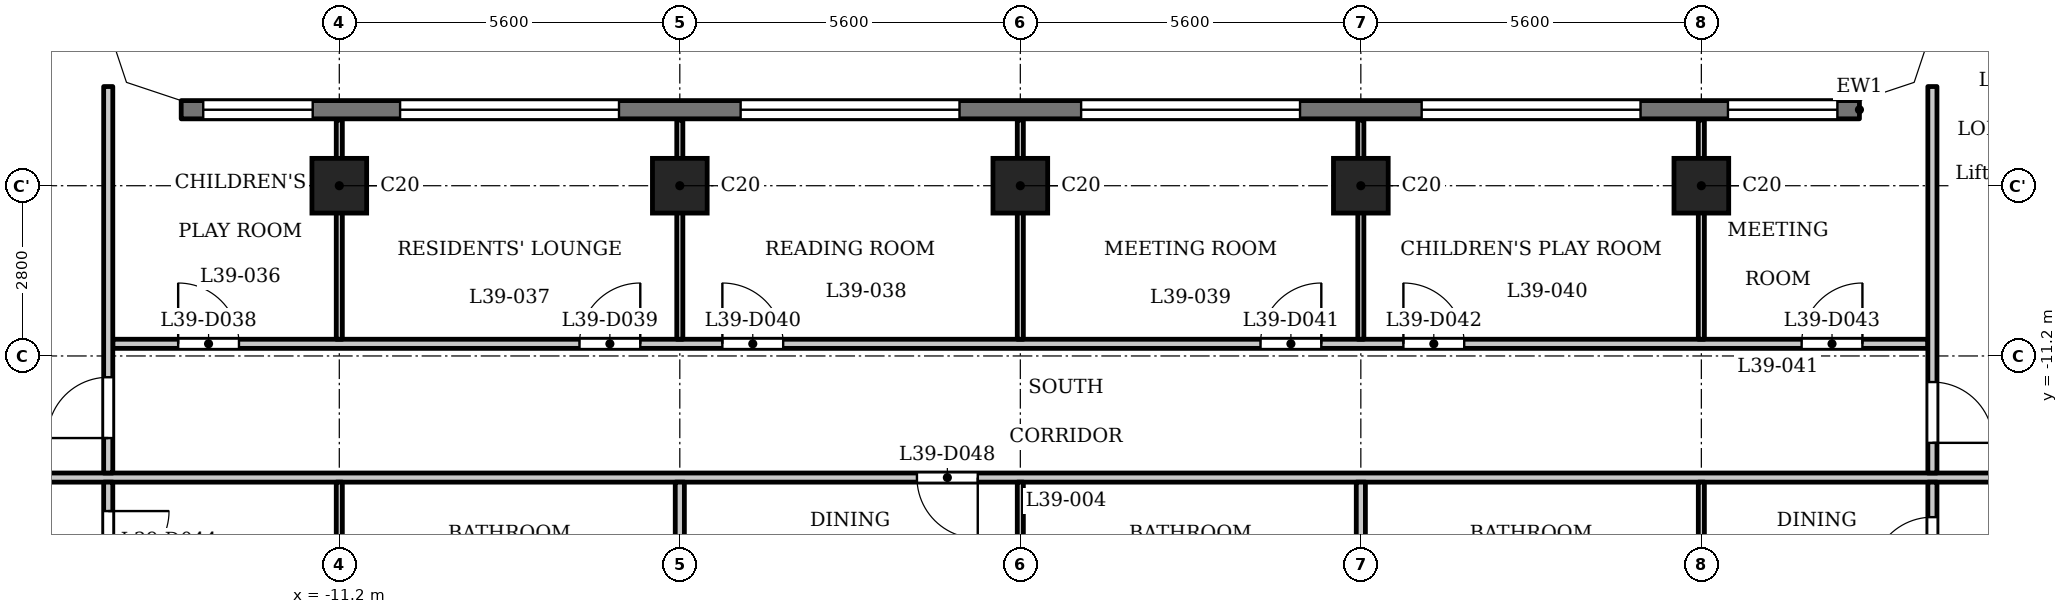
"""IFC4 building model, lengths in metres.
Left out: names, types, materials, properties, quantities, classifications, styles, units other than length and angle.
Written with IfcOpenShell. Run it as: python <this file> out.ifc"""

import sys

from ifc_helpers import new_model, si_unit, direction, frame, frame_2d, origin, origin_2d, place, context, subcontext, project, spatial, polyline, rectangle, outline, extrude, element, fill, save


model = new_model("IFC4")
c1 = context("Model", 3, precision=1e-05, world=origin(), true_north=direction((0.0, 1.0)))
c2 = subcontext(c1, "Body", "Model", "MODEL_VIEW")
j1 = project(units=[si_unit("LENGTHUNIT", "METRE"), si_unit("PLANEANGLEUNIT", "RADIAN")], contexts=[c1])
p1 = place(None, origin())
s1 = spatial("IfcSite", under=j1, at=p1, CompositionType="ELEMENT")
p2 = place(p1, origin())
s2 = spatial("IfcBuilding", under=s1, at=p2, CompositionType="ELEMENT")
p3 = place(p2, frame((0.0, 0.0, 153.6)))
s3 = spatial("IfcBuildingStorey", under=s2, at=p3, CompositionType="ELEMENT", Elevation=153.6)
for number, where, z_axis, x_axis in (
    (1, (-11.2, -8.4, 0.0), (0.0, 0.0, 1.0), (1.0, 0.0, 0.0)),
    (2, (-5.6, -8.4, 0.0), (0.0, 0.0, 1.0), (1.0, 0.0, 0.0)),
    (3, (0.0, -8.4, 0.0), (0.0, 0.0, 1.0), (1.0, 0.0, 0.0)),
    (4, (5.6, -8.4, 0.0), (0.0, 0.0, 1.0), (1.0, 0.0, 0.0)),
    (5, (11.2, -8.4, 0.0), (0.0, 0.0, 1.0), (1.0, 0.0, 0.0)),
):
    element("IfcColumn", number, at=place(p3, frame(where, z_axis=z_axis, x_axis=x_axis)), inside=s3, PredefinedType="COLUMN", context=c2, shape_type="SweptSolid", body=[
        extrude(rectangle(XDim=0.9, YDim=0.9, at=origin_2d()), origin(), (0.0, 0.0, 1.0), 3.5),
    ])
p4 = place(p3, frame((13.8, -7.15, 0.0), z_axis=(0.0, 0.0, 1.0), x_axis=(-1.0, 0.0, 0.0)))
e6 = element("IfcWall", 6, at=p4, inside=s3, PredefinedType="SOLIDWALL", context=c2, shape_type="SweptSolid", body=[
    extrude(rectangle(XDim=27.6, YDim=0.3, at=frame_2d((13.8, 0.0))), origin(), (0.0, 0.0, 1.0), 3.2),
])
p5 = place(p4, frame((0.363, 0.0, 0.9)))
e7 = element("IfcOpeningElement", 7, at=p5, cuts=e6, PredefinedType="OPENING", context=c2, shape_type="SweptSolid", body=[
    extrude(rectangle(XDim=1.8, YDim=1.25, at=frame_2d((0.9, 0.625))), frame((0.0, 0.16, 0.0), z_axis=(0.0, -1.0, 0.0), x_axis=(1.0, 0.0, 0.0)), (0.0, 0.0, 1.0), 0.32),
])
p6 = place(p4, frame((3.6, 0.0, 1.2)))
e8 = element("IfcOpeningElement", 8, at=p6, cuts=e6, PredefinedType="OPENING", context=c2, shape_type="SweptSolid", body=[
    extrude(rectangle(XDim=3.6, YDim=0.95, at=frame_2d((1.8, 0.475))), frame((0.0, 0.16, 0.0), z_axis=(0.0, -1.0, 0.0), x_axis=(1.0, 0.0, 0.0)), (0.0, 0.0, 1.0), 0.32),
])
p7 = place(p4, frame((9.2, 0.0, 1.2)))
e9 = element("IfcOpeningElement", 9, at=p7, cuts=e6, PredefinedType="OPENING", context=c2, shape_type="SweptSolid", body=[
    extrude(rectangle(XDim=3.6, YDim=0.95, at=frame_2d((1.8, 0.475))), frame((0.0, 0.16, 0.0), z_axis=(0.0, -1.0, 0.0), x_axis=(1.0, 0.0, 0.0)), (0.0, 0.0, 1.0), 0.32),
])
p8 = place(p4, frame((14.8, 0.0, 1.2)))
e10 = element("IfcOpeningElement", 10, at=p8, cuts=e6, PredefinedType="OPENING", context=c2, shape_type="SweptSolid", body=[
    extrude(rectangle(XDim=3.6, YDim=0.95, at=frame_2d((1.8, 0.475))), frame((0.0, 0.16, 0.0), z_axis=(0.0, -1.0, 0.0), x_axis=(1.0, 0.0, 0.0)), (0.0, 0.0, 1.0), 0.32),
])
p9 = place(p4, frame((20.4, 0.0, 1.2)))
e11 = element("IfcOpeningElement", 11, at=p9, cuts=e6, PredefinedType="OPENING", context=c2, shape_type="SweptSolid", body=[
    extrude(rectangle(XDim=3.6, YDim=0.95, at=frame_2d((1.8, 0.475))), frame((0.0, 0.16, 0.0), z_axis=(0.0, -1.0, 0.0), x_axis=(1.0, 0.0, 0.0)), (0.0, 0.0, 1.0), 0.32),
])
p10 = place(p4, frame((25.438, 0.0, 0.9)))
e12 = element("IfcOpeningElement", 12, at=p10, cuts=e6, PredefinedType="OPENING", context=c2, shape_type="SweptSolid", body=[
    extrude(rectangle(XDim=1.8, YDim=1.25, at=frame_2d((0.9, 0.625))), frame((0.0, 0.16, 0.0), z_axis=(0.0, -1.0, 0.0), x_axis=(1.0, 0.0, 0.0)), (0.0, 0.0, 1.0), 0.32),
])
p11 = place(p3, frame((-17.4, -13.2, 0.0), z_axis=(0.0, 0.0, 1.0), x_axis=(1.0, 0.0, 0.0)))
e13 = element("IfcWall", 13, at=p11, inside=s3, PredefinedType="PARTITIONING", context=c2, shape_type="SweptSolid", body=[
    extrude(rectangle(XDim=34.8, YDim=0.15, at=frame_2d((17.4, 0.0))), origin(), (0.0, 0.0, 1.0), 3.2),
])
p12 = place(p11, frame((0.15, 0.0, 0.0)))
e14 = element("IfcOpeningElement", 14, at=p12, cuts=e13, PredefinedType="OPENING", context=c2, shape_type="SweptSolid", body=[
    extrude(rectangle(XDim=1.0, YDim=2.1, at=frame_2d((0.5, 1.05))), frame((0.0, 0.085, 0.0), z_axis=(0.0, -1.0, 0.0), x_axis=(1.0, 0.0, 0.0)), (0.0, 0.0, 1.0), 0.17),
])
p13 = place(p11, frame((33.55, 0.0, 0.0)))
e15 = element("IfcOpeningElement", 15, at=p13, cuts=e13, PredefinedType="OPENING", context=c2, shape_type="SweptSolid", body=[
    extrude(rectangle(XDim=1.0, YDim=2.1, at=frame_2d((0.5, 1.05))), frame((0.0, 0.085, 0.0), z_axis=(0.0, -1.0, 0.0), x_axis=(1.0, 0.0, 0.0)), (0.0, 0.0, 1.0), 0.17),
])
p14 = place(p11, frame((15.7, 0.0, 0.0)))
e16 = element("IfcOpeningElement", 16, at=p14, cuts=e13, PredefinedType="OPENING", context=c2, shape_type="SweptSolid", body=[
    extrude(rectangle(XDim=1.0, YDim=2.1, at=frame_2d((0.5, 1.05))), frame((0.0, 0.085, 0.0), z_axis=(0.0, -1.0, 0.0), x_axis=(1.0, 0.0, 0.0)), (0.0, 0.0, 1.0), 0.17),
])
p15 = place(p3, frame((-14.925, -11.0, 0.0), z_axis=(0.0, 0.0, 1.0), x_axis=(1.0, 0.0, 0.0)))
e17 = element("IfcWall", 17, at=p15, inside=s3, PredefinedType="PARTITIONING", context=c2, shape_type="SweptSolid", body=[
    extrude(rectangle(XDim=29.85, YDim=0.15, at=frame_2d((14.925, 0.0))), origin(), (0.0, 0.0, 1.0), 3.2),
])
p16 = place(p15, frame((1.075, 0.0, 0.0)))
e18 = element("IfcOpeningElement", 18, at=p16, cuts=e17, PredefinedType="OPENING", context=c2, shape_type="SweptSolid", body=[
    extrude(rectangle(XDim=1.0, YDim=2.1, at=frame_2d((0.5, 1.05))), frame((0.0, 0.085, 0.0), z_axis=(0.0, -1.0, 0.0), x_axis=(1.0, 0.0, 0.0)), (0.0, 0.0, 1.0), 0.17),
])
p17 = place(p15, frame((7.675, 0.0, 0.0)))
e19 = element("IfcOpeningElement", 19, at=p17, cuts=e17, PredefinedType="OPENING", context=c2, shape_type="SweptSolid", body=[
    extrude(rectangle(XDim=1.0, YDim=2.1, at=frame_2d((0.5, 1.05))), frame((0.0, 0.085, 0.0), z_axis=(0.0, -1.0, 0.0), x_axis=(1.0, 0.0, 0.0)), (0.0, 0.0, 1.0), 0.17),
])
p18 = place(p15, frame((10.025, 0.0, 0.0)))
e20 = element("IfcOpeningElement", 20, at=p18, cuts=e17, PredefinedType="OPENING", context=c2, shape_type="SweptSolid", body=[
    extrude(rectangle(XDim=1.0, YDim=2.1, at=frame_2d((0.5, 1.05))), frame((0.0, 0.085, 0.0), z_axis=(0.0, -1.0, 0.0), x_axis=(1.0, 0.0, 0.0)), (0.0, 0.0, 1.0), 0.17),
])
p19 = place(p15, frame((18.875, 0.0, 0.0)))
e21 = element("IfcOpeningElement", 21, at=p19, cuts=e17, PredefinedType="OPENING", context=c2, shape_type="SweptSolid", body=[
    extrude(rectangle(XDim=1.0, YDim=2.1, at=frame_2d((0.5, 1.05))), frame((0.0, 0.085, 0.0), z_axis=(0.0, -1.0, 0.0), x_axis=(1.0, 0.0, 0.0)), (0.0, 0.0, 1.0), 0.17),
])
p20 = place(p15, frame((21.225, 0.0, 0.0)))
e22 = element("IfcOpeningElement", 22, at=p20, cuts=e17, PredefinedType="OPENING", context=c2, shape_type="SweptSolid", body=[
    extrude(rectangle(XDim=1.0, YDim=2.1, at=frame_2d((0.5, 1.05))), frame((0.0, 0.085, 0.0), z_axis=(0.0, -1.0, 0.0), x_axis=(1.0, 0.0, 0.0)), (0.0, 0.0, 1.0), 0.17),
])
p21 = place(p15, frame((27.774, 0.0, 0.0)))
e23 = element("IfcOpeningElement", 23, at=p21, cuts=e17, PredefinedType="OPENING", context=c2, shape_type="SweptSolid", body=[
    extrude(rectangle(XDim=1.0, YDim=2.1, at=frame_2d((0.5, 1.05))), frame((0.0, 0.085, 0.0), z_axis=(0.0, -1.0, 0.0), x_axis=(1.0, 0.0, 0.0)), (0.0, 0.0, 1.0), 0.17),
])
p22 = place(p3, frame((-15.0, -15.325, 0.0), z_axis=(0.0, 0.0, 1.0), x_axis=(0.0, 1.0, 0.0)))
e24 = element("IfcWall", 24, at=p22, inside=s3, PredefinedType="PARTITIONING", context=c2, shape_type="SweptSolid", body=[
    extrude(rectangle(XDim=2.05, YDim=0.15, at=frame_2d((1.025, 0.0))), origin(), (0.0, 0.0, 1.0), 3.2),
])
p23 = place(p22, frame((0.574, 0.0, 0.0)))
e25 = element("IfcOpeningElement", 25, at=p23, cuts=e24, PredefinedType="OPENING", context=c2, shape_type="SweptSolid", body=[
    extrude(rectangle(XDim=1.0, YDim=2.1, at=frame_2d((0.5, 1.05))), frame((0.0, 0.085, 0.0), z_axis=(0.0, -1.0, 0.0), x_axis=(1.0, 0.0, 0.0)), (0.0, 0.0, 1.0), 0.17),
])
p24 = place(p3, frame((-15.0, -13.125, 0.0), z_axis=(0.0, 0.0, 1.0), x_axis=(0.0, 1.0, 0.0)))
e26 = element("IfcWall", 26, at=p24, inside=s3, PredefinedType="PARTITIONING", context=c2, shape_type="SweptSolid", body=[
    extrude(rectangle(XDim=6.356, YDim=0.15, at=frame_2d((3.178, 0.0))), origin(), (0.0, 0.0, 1.0), 3.2),
])
p25 = place(p24, frame((0.575, 0.0, 0.0)))
e27 = element("IfcOpeningElement", 27, at=p25, cuts=e26, PredefinedType="OPENING", context=c2, shape_type="SweptSolid", body=[
    extrude(rectangle(XDim=1.0, YDim=2.1, at=frame_2d((0.5, 1.05))), frame((0.0, 0.085, 0.0), z_axis=(0.0, -1.0, 0.0), x_axis=(1.0, 0.0, 0.0)), (0.0, 0.0, 1.0), 0.17),
])
p26 = place(p3, frame((-11.2, -16.45, 0.0), z_axis=(0.0, 0.0, 1.0), x_axis=(0.0, 1.0, 0.0)))
e28 = element("IfcWall", 28, at=p26, inside=s3, PredefinedType="PARTITIONING", context=c2, shape_type="SweptSolid", body=[
    extrude(rectangle(XDim=3.175, YDim=0.1, at=frame_2d((1.587, 0.0))), origin(), (0.0, 0.0, 1.0), 3.2),
])
for number, where, z_axis, x_axis in (
    (29, (-11.2, -10.925, 0.0), (0.0, 0.0, 1.0), (0.0, 1.0, 0.0)),
    (30, (-5.6, -10.925, 0.0), (0.0, 0.0, 1.0), (0.0, 1.0, 0.0)),
):
    element("IfcWall", number, at=place(p3, frame(where, z_axis=z_axis, x_axis=x_axis)), inside=s3, PredefinedType="PARTITIONING", context=c2, shape_type="SweptSolid", body=[
        extrude(rectangle(XDim=3.605, YDim=0.1, at=frame_2d((1.802, 0.0))), origin(), (0.0, 0.0, 1.0), 3.2),
    ])
p27 = place(p3, frame((-5.6, -16.45, 0.0), z_axis=(0.0, 0.0, 1.0), x_axis=(0.0, 1.0, 0.0)))
e31 = element("IfcWall", 31, at=p27, inside=s3, PredefinedType="PARTITIONING", context=c2, shape_type="SweptSolid", body=[
    extrude(rectangle(XDim=3.175, YDim=0.15, at=frame_2d((1.587, 0.0))), origin(), (0.0, 0.0, 1.0), 3.2),
])
p28 = place(p3, frame((0.0, -16.45, 0.0), z_axis=(0.0, 0.0, 1.0), x_axis=(0.0, 1.0, 0.0)))
e32 = element("IfcWall", 32, at=p28, inside=s3, PredefinedType="PARTITIONING", context=c2, shape_type="SweptSolid", body=[
    extrude(rectangle(XDim=3.175, YDim=0.1, at=frame_2d((1.587, 0.0))), origin(), (0.0, 0.0, 1.0), 3.2),
])
for number, where, z_axis, x_axis in (
    (33, (0.0, -10.925, 0.0), (0.0, 0.0, 1.0), (0.0, 1.0, 0.0)),
    (34, (5.6, -10.925, 0.0), (0.0, 0.0, 1.0), (0.0, 1.0, 0.0)),
):
    element("IfcWall", number, at=place(p3, frame(where, z_axis=z_axis, x_axis=x_axis)), inside=s3, PredefinedType="PARTITIONING", context=c2, shape_type="SweptSolid", body=[
        extrude(rectangle(XDim=3.605, YDim=0.1, at=frame_2d((1.802, 0.0))), origin(), (0.0, 0.0, 1.0), 3.2),
    ])
p29 = place(p3, frame((5.6, -16.45, 0.0), z_axis=(0.0, 0.0, 1.0), x_axis=(0.0, 1.0, 0.0)))
e35 = element("IfcWall", 35, at=p29, inside=s3, PredefinedType="PARTITIONING", context=c2, shape_type="SweptSolid", body=[
    extrude(rectangle(XDim=3.175, YDim=0.15, at=frame_2d((1.587, 0.0))), origin(), (0.0, 0.0, 1.0), 3.2),
])
p30 = place(p3, frame((11.2, -16.45, 0.0), z_axis=(0.0, 0.0, 1.0), x_axis=(0.0, 1.0, 0.0)))
e36 = element("IfcWall", 36, at=p30, inside=s3, PredefinedType="PARTITIONING", context=c2, shape_type="SweptSolid", body=[
    extrude(rectangle(XDim=3.175, YDim=0.1, at=frame_2d((1.587, 0.0))), origin(), (0.0, 0.0, 1.0), 3.2),
])
p31 = place(p3, frame((11.2, -10.925, 0.0), z_axis=(0.0, 0.0, 1.0), x_axis=(0.0, 1.0, 0.0)))
e37 = element("IfcWall", 37, at=p31, inside=s3, PredefinedType="PARTITIONING", context=c2, shape_type="SweptSolid", body=[
    extrude(rectangle(XDim=3.605, YDim=0.1, at=frame_2d((1.802, 0.0))), origin(), (0.0, 0.0, 1.0), 3.2),
])
p32 = place(p3, frame((15.0, -15.325, 0.0), z_axis=(0.0, 0.0, 1.0), x_axis=(0.0, 1.0, 0.0)))
e38 = element("IfcWall", 38, at=p32, inside=s3, PredefinedType="PARTITIONING", context=c2, shape_type="SweptSolid", body=[
    extrude(rectangle(XDim=2.05, YDim=0.15, at=frame_2d((1.025, 0.0))), origin(), (0.0, 0.0, 1.0), 3.2),
])
p33 = place(p32, frame((0.474, 0.0, 0.0)))
e39 = element("IfcOpeningElement", 39, at=p33, cuts=e38, PredefinedType="OPENING", context=c2, shape_type="SweptSolid", body=[
    extrude(rectangle(XDim=1.0, YDim=2.1, at=frame_2d((0.5, 1.05))), frame((0.0, 0.085, 0.0), z_axis=(0.0, -1.0, 0.0), x_axis=(1.0, 0.0, 0.0)), (0.0, 0.0, 1.0), 0.17),
])
p34 = place(p3, frame((15.0, -13.125, 0.0), z_axis=(0.0, 0.0, 1.0), x_axis=(0.0, 1.0, 0.0)))
e40 = element("IfcWall", 40, at=p34, inside=s3, PredefinedType="PARTITIONING", context=c2, shape_type="SweptSolid", body=[
    extrude(rectangle(XDim=6.356, YDim=0.15, at=frame_2d((3.178, 0.0))), origin(), (0.0, 0.0, 1.0), 3.2),
])
p35 = place(p34, frame((0.496, 0.0, 0.0)))
e41 = element("IfcOpeningElement", 41, at=p35, cuts=e40, PredefinedType="OPENING", context=c2, shape_type="SweptSolid", body=[
    extrude(rectangle(XDim=1.0, YDim=2.1, at=frame_2d((0.5, 1.05))), frame((0.0, 0.085, 0.0), z_axis=(0.0, -1.0, 0.0), x_axis=(1.0, 0.0, 0.0)), (0.0, 0.0, 1.0), 0.17),
])
p36 = place(p3, origin())
e42 = element("IfcWall", 42, at=p36, inside=s3, PredefinedType="SOLIDWALL", context=c2, shape_type="SweptSolid", body=[
    extrude(outline(polyline([(14.937, -6.937), (15.3, -5.849), (15.3, -5.8), (15.0, -5.8), (14.7, -6.7), (13.8, -7.0), (13.8, -7.3), (13.849, -7.3), (14.937, -6.937)])), origin(), (0.0, 0.0, 1.0), 3.2),
])
e43 = element("IfcWall", 43, at=p36, inside=s3, PredefinedType="SOLIDWALL", context=c2, shape_type="SweptSolid", body=[
    extrude(outline(polyline([(-14.937, -6.937), (-13.849, -7.3), (-13.8, -7.3), (-13.8, -7.0), (-14.7, -6.7), (-15.0, -5.8), (-15.3, -5.8), (-15.3, -5.849), (-14.937, -6.937)])), origin(), (0.0, 0.0, 1.0), 3.2),
])
p37 = place(p25, origin())
e44 = element("IfcDoor", 44, at=p37, inside=s3, OperationType="SINGLE_SWING_RIGHT", PredefinedType="DOOR", context=c2, shape_type="SweptSolid", body=[
    extrude(rectangle(XDim=1.0, YDim=2.1, at=frame_2d((0.5, 1.05))), frame((0.0, 0.025, 0.0), z_axis=(0.0, -1.0, 0.0), x_axis=(1.0, 0.0, 0.0)), (0.0, 0.0, 1.0), 0.05),
])
fill(e27, e44)
p38 = place(p35, origin())
e45 = element("IfcDoor", 45, at=p38, inside=s3, OperationType="SINGLE_SWING_LEFT", PredefinedType="DOOR", context=c2, shape_type="SweptSolid", body=[
    extrude(rectangle(XDim=1.0, YDim=2.1, at=frame_2d((0.5, 1.05))), frame((0.0, 0.025, 0.0), z_axis=(0.0, -1.0, 0.0), x_axis=(1.0, 0.0, 0.0)), (0.0, 0.0, 1.0), 0.05),
])
fill(e41, e45)
p39 = place(p16, origin())
e46 = element("IfcDoor", 46, at=p39, inside=s3, OperationType="SINGLE_SWING_RIGHT", PredefinedType="DOOR", context=c2, shape_type="SweptSolid", body=[
    extrude(rectangle(XDim=1.0, YDim=2.1, at=frame_2d((0.5, 1.05))), frame((0.0, 0.025, 0.0), z_axis=(0.0, -1.0, 0.0), x_axis=(1.0, 0.0, 0.0)), (0.0, 0.0, 1.0), 0.05),
])
fill(e18, e46)
p40 = place(p17, origin())
e47 = element("IfcDoor", 47, at=p40, inside=s3, OperationType="SINGLE_SWING_LEFT", PredefinedType="DOOR", context=c2, shape_type="SweptSolid", body=[
    extrude(rectangle(XDim=1.0, YDim=2.1, at=frame_2d((0.5, 1.05))), frame((0.0, 0.025, 0.0), z_axis=(0.0, -1.0, 0.0), x_axis=(1.0, 0.0, 0.0)), (0.0, 0.0, 1.0), 0.05),
])
fill(e19, e47)
p41 = place(p18, origin())
e48 = element("IfcDoor", 48, at=p41, inside=s3, OperationType="SINGLE_SWING_RIGHT", PredefinedType="DOOR", context=c2, shape_type="SweptSolid", body=[
    extrude(rectangle(XDim=1.0, YDim=2.1, at=frame_2d((0.5, 1.05))), frame((0.0, 0.025, 0.0), z_axis=(0.0, -1.0, 0.0), x_axis=(1.0, 0.0, 0.0)), (0.0, 0.0, 1.0), 0.05),
])
fill(e20, e48)
p42 = place(p19, origin())
e49 = element("IfcDoor", 49, at=p42, inside=s3, OperationType="SINGLE_SWING_LEFT", PredefinedType="DOOR", context=c2, shape_type="SweptSolid", body=[
    extrude(rectangle(XDim=1.0, YDim=2.1, at=frame_2d((0.5, 1.05))), frame((0.0, 0.025, 0.0), z_axis=(0.0, -1.0, 0.0), x_axis=(1.0, 0.0, 0.0)), (0.0, 0.0, 1.0), 0.05),
])
fill(e21, e49)
p43 = place(p20, origin())
e50 = element("IfcDoor", 50, at=p43, inside=s3, OperationType="SINGLE_SWING_RIGHT", PredefinedType="DOOR", context=c2, shape_type="SweptSolid", body=[
    extrude(rectangle(XDim=1.0, YDim=2.1, at=frame_2d((0.5, 1.05))), frame((0.0, 0.025, 0.0), z_axis=(0.0, -1.0, 0.0), x_axis=(1.0, 0.0, 0.0)), (0.0, 0.0, 1.0), 0.05),
])
fill(e22, e50)
p44 = place(p21, origin())
e51 = element("IfcDoor", 51, at=p44, inside=s3, OperationType="SINGLE_SWING_LEFT", PredefinedType="DOOR", context=c2, shape_type="SweptSolid", body=[
    extrude(rectangle(XDim=1.0, YDim=2.1, at=frame_2d((0.5, 1.05))), frame((0.0, 0.025, 0.0), z_axis=(0.0, -1.0, 0.0), x_axis=(1.0, 0.0, 0.0)), (0.0, 0.0, 1.0), 0.05),
])
fill(e23, e51)
p45 = place(p23, origin())
e52 = element("IfcDoor", 52, at=p45, inside=s3, OperationType="SINGLE_SWING_RIGHT", PredefinedType="DOOR", context=c2, shape_type="SweptSolid", body=[
    extrude(rectangle(XDim=1.0, YDim=2.1, at=frame_2d((0.5, 1.05))), frame((0.0, 0.025, 0.0), z_axis=(0.0, -1.0, 0.0), x_axis=(1.0, 0.0, 0.0)), (0.0, 0.0, 1.0), 0.05),
])
fill(e25, e52)
p46 = place(p14, origin())
e53 = element("IfcDoor", 53, at=p46, inside=s3, OperationType="SINGLE_SWING_RIGHT", PredefinedType="DOOR", context=c2, shape_type="SweptSolid", body=[
    extrude(rectangle(XDim=1.0, YDim=2.1, at=frame_2d((0.5, 1.05))), frame((0.0, 0.025, 0.0), z_axis=(0.0, -1.0, 0.0), x_axis=(1.0, 0.0, 0.0)), (0.0, 0.0, 1.0), 0.05),
])
fill(e16, e53)
p47 = place(p33, origin())
e54 = element("IfcDoor", 54, at=p47, inside=s3, OperationType="SINGLE_SWING_RIGHT", PredefinedType="DOOR", context=c2, shape_type="SweptSolid", body=[
    extrude(rectangle(XDim=1.0, YDim=2.1, at=frame_2d((0.5, 1.05))), frame((0.0, 0.025, 0.0), z_axis=(0.0, -1.0, 0.0), x_axis=(1.0, 0.0, 0.0)), (0.0, 0.0, 1.0), 0.05),
])
fill(e39, e54)
p48 = place(p5, origin())
e55 = element("IfcWindow", 55, at=p48, inside=s3, PartitioningType="SINGLE_PANEL", PredefinedType="WINDOW", context=c2, shape_type="SweptSolid", body=[
    extrude(rectangle(XDim=1.8, YDim=1.25, at=frame_2d((0.9, 0.625))), frame((0.0, 0.03, 0.0), z_axis=(0.0, -1.0, 0.0), x_axis=(1.0, 0.0, 0.0)), (0.0, 0.0, 1.0), 0.06),
])
fill(e7, e55)
p49 = place(p6, origin())
e56 = element("IfcWindow", 56, at=p49, inside=s3, PartitioningType="SINGLE_PANEL", PredefinedType="WINDOW", context=c2, shape_type="SweptSolid", body=[
    extrude(rectangle(XDim=3.6, YDim=0.95, at=frame_2d((1.8, 0.475))), frame((0.0, 0.03, 0.0), z_axis=(0.0, -1.0, 0.0), x_axis=(1.0, 0.0, 0.0)), (0.0, 0.0, 1.0), 0.06),
])
fill(e8, e56)
p50 = place(p7, origin())
e57 = element("IfcWindow", 57, at=p50, inside=s3, PartitioningType="SINGLE_PANEL", PredefinedType="WINDOW", context=c2, shape_type="SweptSolid", body=[
    extrude(rectangle(XDim=3.6, YDim=0.95, at=frame_2d((1.8, 0.475))), frame((0.0, 0.03, 0.0), z_axis=(0.0, -1.0, 0.0), x_axis=(1.0, 0.0, 0.0)), (0.0, 0.0, 1.0), 0.06),
])
fill(e9, e57)
p51 = place(p8, origin())
e58 = element("IfcWindow", 58, at=p51, inside=s3, PartitioningType="SINGLE_PANEL", PredefinedType="WINDOW", context=c2, shape_type="SweptSolid", body=[
    extrude(rectangle(XDim=3.6, YDim=0.95, at=frame_2d((1.8, 0.475))), frame((0.0, 0.03, 0.0), z_axis=(0.0, -1.0, 0.0), x_axis=(1.0, 0.0, 0.0)), (0.0, 0.0, 1.0), 0.06),
])
fill(e10, e58)
p52 = place(p9, origin())
e59 = element("IfcWindow", 59, at=p52, inside=s3, PartitioningType="SINGLE_PANEL", PredefinedType="WINDOW", context=c2, shape_type="SweptSolid", body=[
    extrude(rectangle(XDim=3.6, YDim=0.95, at=frame_2d((1.8, 0.475))), frame((0.0, 0.03, 0.0), z_axis=(0.0, -1.0, 0.0), x_axis=(1.0, 0.0, 0.0)), (0.0, 0.0, 1.0), 0.06),
])
fill(e11, e59)
p53 = place(p10, origin())
e60 = element("IfcWindow", 60, at=p53, inside=s3, PartitioningType="SINGLE_PANEL", PredefinedType="WINDOW", context=c2, shape_type="SweptSolid", body=[
    extrude(rectangle(XDim=1.8, YDim=1.25, at=frame_2d((0.9, 0.625))), frame((0.0, 0.03, 0.0), z_axis=(0.0, -1.0, 0.0), x_axis=(1.0, 0.0, 0.0)), (0.0, 0.0, 1.0), 0.06),
])
fill(e12, e60)
save(model, sys.argv[1])
